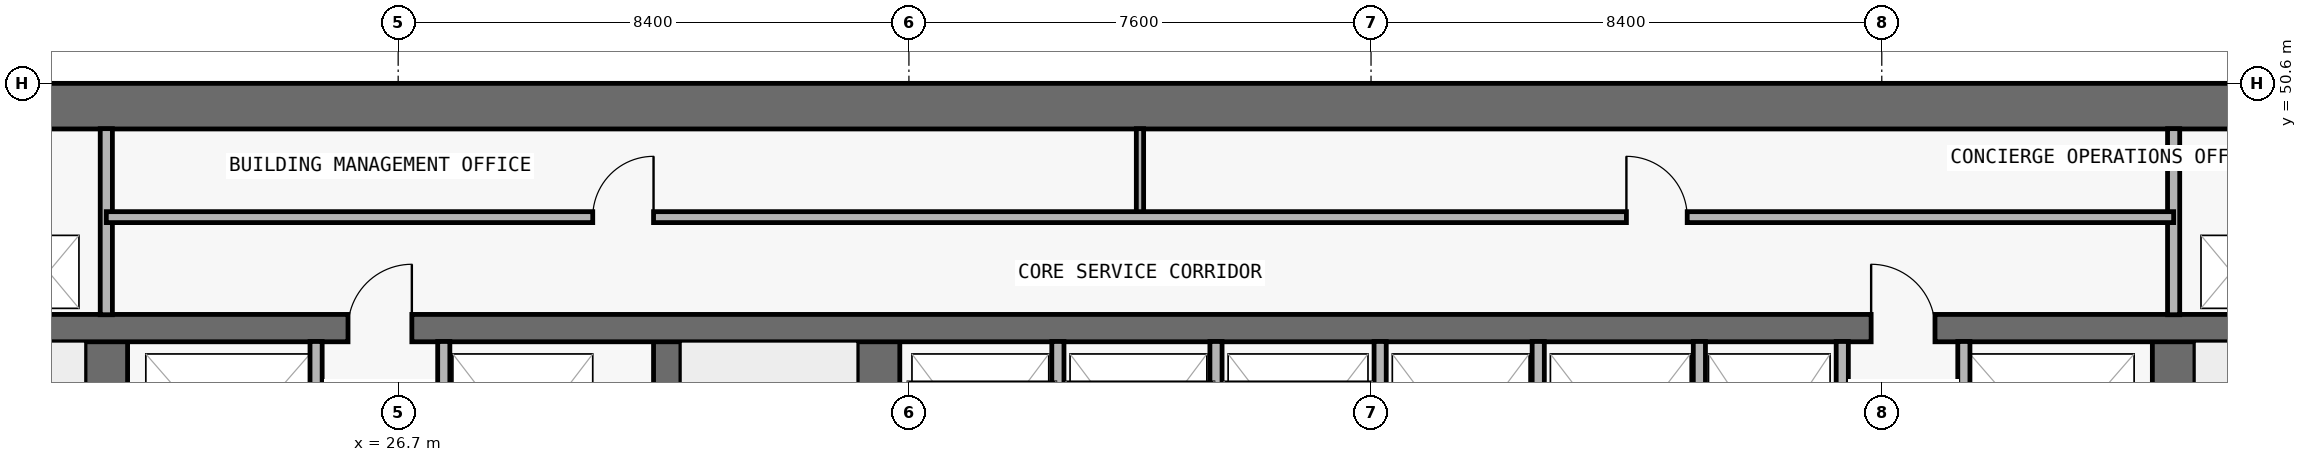
"""IFC4 building model, lengths in metres.
Left out: names, types, materials, properties, quantities, classifications, styles, units other than length and angle.
Written with IfcOpenShell. Run it as: python <this file> out.ifc"""

import sys

from ifc_helpers import new_model, si_unit, direction, frame, frame_2d, origin, place, context, subcontext, project, spatial, rectangle, extrude, element, fill, save


model = new_model("IFC4")
c1 = context("Model", 3, precision=1e-05, world=origin(), true_north=direction((0.0, 1.0)))
c2 = subcontext(c1, "Body", "Model", "MODEL_VIEW")
j1 = project(units=[si_unit("LENGTHUNIT", "METRE"), si_unit("PLANEANGLEUNIT", "RADIAN")], contexts=[c1])
p1 = place(None, origin())
s1 = spatial("IfcSite", under=j1, at=p1, CompositionType="ELEMENT")
p2 = place(p1, origin())
s2 = spatial("IfcBuilding", under=s1, at=p2, CompositionType="ELEMENT")
p3 = place(p2, frame((0.0, 0.0, 53.1)))
s3 = spatial("IfcBuildingStorey", under=s2, at=p3, CompositionType="ELEMENT", Elevation=53.1)
p4 = place(p3, frame((17.75, 50.225, 0.0), z_axis=(0.0, 0.0, 1.0), x_axis=(1.0, 0.0, 0.0)))
e1 = element("IfcWall", 1, at=p4, inside=s3, PredefinedType="SHEAR", context=c2, shape_type="SweptSolid", body=[
    extrude(rectangle(XDim=42.3, YDim=0.75, at=frame_2d((21.15, 0.0))), origin(), (0.0, 0.0, 1.0), 3.05),
])
p5 = place(p3, frame((21.9, 36.9, 0.0), z_axis=(0.0, 0.0, 1.0), x_axis=(0.0, 1.0, 0.0)))
e2 = element("IfcWall", 2, at=p5, inside=s3, PredefinedType="SHEAR", context=c2, shape_type="SweptSolid", body=[
    extrude(rectangle(XDim=9.675, YDim=0.7, at=frame_2d((4.837, 0.0))), origin(), (0.0, 0.0, 1.0), 3.05),
])
p6 = place(p5, frame((0.65, 0.0, 0.0)))
e3 = element("IfcOpeningElement", 3, at=p6, cuts=e2, PredefinedType="OPENING", context=c2, shape_type="SweptSolid", body=[
    extrude(rectangle(XDim=1.1, YDim=2.15, at=frame_2d((0.55, 1.075))), frame((0.0, 0.36, 0.0), z_axis=(0.0, -1.0, 0.0), x_axis=(1.0, 0.0, 0.0)), (0.0, 0.0, 1.0), 0.72),
])
p7 = place(p3, frame((55.9, 36.9, 0.0), z_axis=(0.0, 0.0, 1.0), x_axis=(0.0, 1.0, 0.0)))
e4 = element("IfcWall", 4, at=p7, inside=s3, PredefinedType="SHEAR", context=c2, shape_type="SweptSolid", body=[
    extrude(rectangle(XDim=9.675, YDim=0.7, at=frame_2d((4.837, 0.0))), origin(), (0.0, 0.0, 1.0), 3.05),
])
p8 = place(p7, frame((0.65, 0.0, 0.0)))
e5 = element("IfcOpeningElement", 5, at=p8, cuts=e4, PredefinedType="OPENING", context=c2, shape_type="SweptSolid", body=[
    extrude(rectangle(XDim=1.1, YDim=2.15, at=frame_2d((0.55, 1.075))), frame((0.0, 0.36, 0.0), z_axis=(0.0, -1.0, 0.0), x_axis=(1.0, 0.0, 0.0)), (0.0, 0.0, 1.0), 0.72),
])
p9 = place(p3, frame((31.125, 36.9, 0.0), z_axis=(0.0, 0.0, 1.0), x_axis=(0.0, 1.0, 0.0)))
e6 = element("IfcWall", 6, at=p9, inside=s3, PredefinedType="SHEAR", context=c2, shape_type="SweptSolid", body=[
    extrude(rectangle(XDim=9.675, YDim=0.45, at=frame_2d((4.837, 0.0))), origin(), (0.0, 0.0, 1.0), 3.05),
])
p10 = place(p3, frame((34.6, 36.9, 0.0), z_axis=(0.0, 0.0, 1.0), x_axis=(0.0, 1.0, 0.0)))
e7 = element("IfcWall", 7, at=p10, inside=s3, PredefinedType="SHEAR", context=c2, shape_type="SweptSolid", body=[
    extrude(rectangle(XDim=9.675, YDim=0.7, at=frame_2d((4.837, 0.0))), origin(), (0.0, 0.0, 1.0), 3.05),
])
p11 = place(p3, frame((18.2, 46.575, 0.0), z_axis=(0.0, 0.0, 1.0), x_axis=(1.0, 0.0, 0.0)))
e8 = element("IfcWall", 8, at=p11, inside=s3, PredefinedType="SHEAR", context=c2, shape_type="SweptSolid", body=[
    extrude(rectangle(XDim=41.4, YDim=0.45, at=frame_2d((20.7, 0.0))), origin(), (0.0, 0.0, 1.0), 3.05),
])
p12 = place(p11, frame((7.675, 0.0, 0.0)))
e9 = element("IfcOpeningElement", 9, at=p12, cuts=e8, PredefinedType="OPENING", context=c2, shape_type="SweptSolid", body=[
    extrude(rectangle(XDim=1.05, YDim=2.15, at=frame_2d((0.525, 1.075))), frame((0.0, 0.235, 0.0), z_axis=(0.0, -1.0, 0.0), x_axis=(1.0, 0.0, 0.0)), (0.0, 0.0, 1.0), 0.47),
])
p13 = place(p11, frame((32.725, 0.0, 0.0)))
e10 = element("IfcOpeningElement", 10, at=p13, cuts=e8, PredefinedType="OPENING", context=c2, shape_type="SweptSolid", body=[
    extrude(rectangle(XDim=1.05, YDim=2.15, at=frame_2d((0.525, 1.075))), frame((0.0, 0.235, 0.0), z_axis=(0.0, -1.0, 0.0), x_axis=(1.0, 0.0, 0.0)), (0.0, 0.0, 1.0), 0.47),
])
p14 = place(p3, frame((21.9, 46.795, 0.0), z_axis=(0.0, 0.0, 1.0), x_axis=(0.0, 1.0, 0.0)))
e11 = element("IfcWall", 11, at=p14, inside=s3, PredefinedType="PARTITIONING", context=c2, shape_type="SweptSolid", body=[
    extrude(rectangle(XDim=3.06, YDim=0.2, at=frame_2d((1.53, 0.0))), origin(), (0.0, 0.0, 1.0), 3.05),
])
for number, where, z_axis, x_axis in (
    (12, (25.35, 43.17, 0.0), (0.0, 0.0, 1.0), (0.0, 1.0, 0.0)),
    (13, (27.45, 43.17, 0.0), (0.0, 0.0, 1.0), (0.0, 1.0, 0.0)),
    (14, (37.55, 43.17, 0.0), (0.0, 0.0, 1.0), (0.0, 1.0, 0.0)),
):
    element("IfcWall", number, at=place(p3, frame(where, z_axis=z_axis, x_axis=x_axis)), inside=s3, PredefinedType="PARTITIONING", context=c2, shape_type="SweptSolid", body=[
        extrude(rectangle(XDim=3.185, YDim=0.2, at=frame_2d((1.593, 0.0))), origin(), (0.0, 0.0, 1.0), 3.05),
    ])
p15 = place(p3, frame((38.9, 48.4, 0.0), z_axis=(0.0, 0.0, 1.0), x_axis=(0.0, 1.0, 0.0)))
e15 = element("IfcWall", 15, at=p15, inside=s3, PredefinedType="PARTITIONING", context=c2, shape_type="SweptSolid", body=[
    extrude(rectangle(XDim=1.455, YDim=0.12, at=frame_2d((0.728, 0.0))), origin(), (0.0, 0.0, 1.0), 3.05),
])
for number, where, z_axis, x_axis in (
    (16, (40.15, 43.17, 0.0), (0.0, 0.0, 1.0), (0.0, 1.0, 0.0)),
    (17, (42.85, 43.17, 0.0), (0.0, 0.0, 1.0), (0.0, 1.0, 0.0)),
    (18, (45.45, 43.17, 0.0), (0.0, 0.0, 1.0), (0.0, 1.0, 0.0)),
    (19, (48.1, 43.17, 0.0), (0.0, 0.0, 1.0), (0.0, 1.0, 0.0)),
    (20, (50.45, 43.17, 0.0), (0.0, 0.0, 1.0), (0.0, 1.0, 0.0)),
    (21, (52.45, 43.17, 0.0), (0.0, 0.0, 1.0), (0.0, 1.0, 0.0)),
):
    element("IfcWall", number, at=place(p3, frame(where, z_axis=z_axis, x_axis=x_axis)), inside=s3, PredefinedType="PARTITIONING", context=c2, shape_type="SweptSolid", body=[
        extrude(rectangle(XDim=3.185, YDim=0.2, at=frame_2d((1.593, 0.0))), origin(), (0.0, 0.0, 1.0), 3.05),
    ])
p16 = place(p3, frame((55.9, 46.795, 0.0), z_axis=(0.0, 0.0, 1.0), x_axis=(0.0, 1.0, 0.0)))
e22 = element("IfcWall", 22, at=p16, inside=s3, PredefinedType="PARTITIONING", context=c2, shape_type="SweptSolid", body=[
    extrude(rectangle(XDim=3.06, YDim=0.2, at=frame_2d((1.53, 0.0))), origin(), (0.0, 0.0, 1.0), 3.05),
])
p17 = place(p3, frame((21.9, 48.4, 0.0), z_axis=(0.0, 0.0, 1.0), x_axis=(1.0, 0.0, 0.0)))
e23 = element("IfcWall", 23, at=p17, inside=s3, PredefinedType="PARTITIONING", context=c2, shape_type="SweptSolid", body=[
    extrude(rectangle(XDim=34.0, YDim=0.18, at=frame_2d((17.0, 0.0))), origin(), (0.0, 0.0, 1.0), 3.05),
])
p18 = place(p17, frame((8.0, 0.0, 0.0)))
e24 = element("IfcOpeningElement", 24, at=p18, cuts=e23, PredefinedType="OPENING", context=c2, shape_type="SweptSolid", body=[
    extrude(rectangle(XDim=1.0, YDim=2.2, at=frame_2d((0.5, 1.1))), frame((0.0, 0.1, 0.0), z_axis=(0.0, -1.0, 0.0), x_axis=(1.0, 0.0, 0.0)), (0.0, 0.0, 1.0), 0.2),
])
p19 = place(p17, frame((25.0, 0.0, 0.0)))
e25 = element("IfcOpeningElement", 25, at=p19, cuts=e23, PredefinedType="OPENING", context=c2, shape_type="SweptSolid", body=[
    extrude(rectangle(XDim=1.0, YDim=2.2, at=frame_2d((0.5, 1.1))), frame((0.0, 0.1, 0.0), z_axis=(0.0, -1.0, 0.0), x_axis=(1.0, 0.0, 0.0)), (0.0, 0.0, 1.0), 0.2),
])
p20 = place(p12, origin())
e26 = element("IfcDoor", 26, at=p20, inside=s3, OperationType="SINGLE_SWING_RIGHT", PredefinedType="DOOR", context=c2, shape_type="SweptSolid", body=[
    extrude(rectangle(XDim=1.05, YDim=2.15, at=frame_2d((0.525, 1.075))), frame((0.0, 0.025, 0.0), z_axis=(0.0, -1.0, 0.0), x_axis=(1.0, 0.0, 0.0)), (0.0, 0.0, 1.0), 0.05),
])
fill(e9, e26)
p21 = place(p13, origin())
e27 = element("IfcDoor", 27, at=p21, inside=s3, OperationType="SINGLE_SWING_LEFT", PredefinedType="DOOR", context=c2, shape_type="SweptSolid", body=[
    extrude(rectangle(XDim=1.05, YDim=2.15, at=frame_2d((0.525, 1.075))), frame((0.0, 0.025, 0.0), z_axis=(0.0, -1.0, 0.0), x_axis=(1.0, 0.0, 0.0)), (0.0, 0.0, 1.0), 0.05),
])
fill(e10, e27)
p22 = place(p18, origin())
e28 = element("IfcDoor", 28, at=p22, inside=s3, OperationType="SINGLE_SWING_RIGHT", PredefinedType="DOOR", context=c2, shape_type="SweptSolid", body=[
    extrude(rectangle(XDim=1.0, YDim=2.2, at=frame_2d((0.5, 1.1))), frame((0.0, 0.025, 0.0), z_axis=(0.0, -1.0, 0.0), x_axis=(1.0, 0.0, 0.0)), (0.0, 0.0, 1.0), 0.05),
])
fill(e24, e28)
p23 = place(p19, origin())
e29 = element("IfcDoor", 29, at=p23, inside=s3, OperationType="SINGLE_SWING_LEFT", PredefinedType="DOOR", context=c2, shape_type="SweptSolid", body=[
    extrude(rectangle(XDim=1.0, YDim=2.2, at=frame_2d((0.5, 1.1))), frame((0.0, 0.025, 0.0), z_axis=(0.0, -1.0, 0.0), x_axis=(1.0, 0.0, 0.0)), (0.0, 0.0, 1.0), 0.05),
])
fill(e25, e29)
save(model, sys.argv[1])
